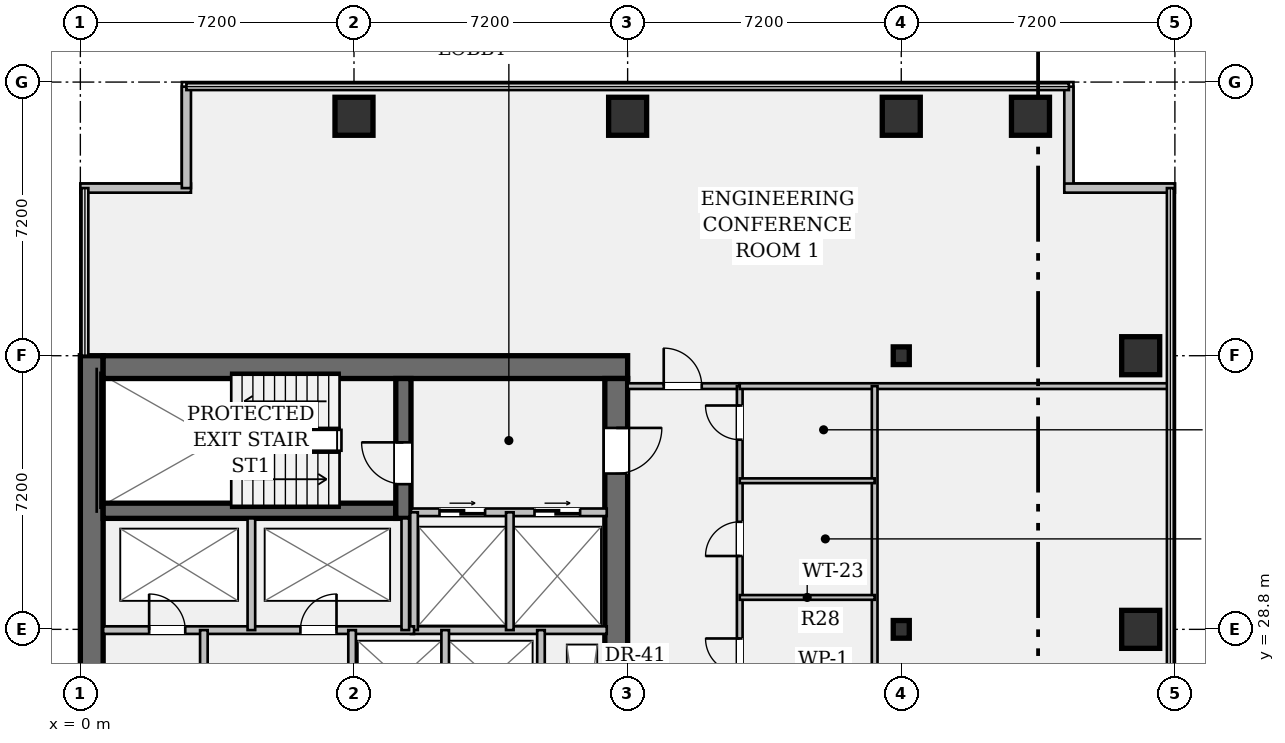
"""IFC4 building model, lengths in metres.
Left out: names, types, materials, properties, quantities, classifications, styles, units other than length and angle.
Written with IfcOpenShell. Run it as: python <this file> out.ifc"""

import sys

from ifc_helpers import new_model, si_unit, direction, frame, frame_2d, origin, origin_2d, place, context, subcontext, project, spatial, rectangle, hollow_rectangle, i_section, extrude, element, fill, save


model = new_model("IFC4")
c1 = context("Model", 3, precision=1e-05, world=origin(), true_north=direction((0.0, 1.0)))
c2 = subcontext(c1, "Body", "Model", "MODEL_VIEW")
j1 = project(units=[si_unit("LENGTHUNIT", "METRE"), si_unit("PLANEANGLEUNIT", "RADIAN")], contexts=[c1])
p1 = place(None, origin())
s1 = spatial("IfcSite", under=j1, at=p1, CompositionType="ELEMENT")
p2 = place(p1, origin())
s2 = spatial("IfcBuilding", under=s1, at=p2, CompositionType="ELEMENT")
p3 = place(p2, frame((0.0, 0.0, 54.25)))
s3 = spatial("IfcBuildingStorey", under=s2, at=p3, CompositionType="ELEMENT", Elevation=54.25)
p4 = place(p3, frame((0.3, 7.2, 0.0), z_axis=(0.0, 0.0, 1.0), x_axis=(0.0, 1.0, 0.0)))
e1 = element("IfcWall", 1, at=p4, inside=s3, PredefinedType="SHEAR", context=c2, shape_type="SweptSolid", body=[
    extrude(rectangle(XDim=28.8, YDim=0.6, at=frame_2d((14.4, 0.0))), origin(), (0.0, 0.0, 1.0), 3.57),
])
p5 = place(p3, frame((0.6, 35.7, 0.0), z_axis=(0.0, 0.0, 1.0), x_axis=(1.0, 0.0, 0.0)))
e2 = element("IfcWall", 2, at=p5, inside=s3, PredefinedType="SHEAR", context=c2, shape_type="SweptSolid", body=[
    extrude(rectangle(XDim=13.8, YDim=0.6, at=frame_2d((6.9, 0.0))), origin(), (0.0, 0.0, 1.0), 3.57),
])
p6 = place(p3, frame((14.1, 35.4, 0.0), z_axis=(0.0, 0.0, 1.0), x_axis=(0.0, -1.0, 0.0)))
e3 = element("IfcWall", 3, at=p6, inside=s3, PredefinedType="SHEAR", context=c2, shape_type="SweptSolid", body=[
    extrude(rectangle(XDim=27.6, YDim=0.6, at=frame_2d((13.8, 0.0))), origin(), (0.0, 0.0, 1.0), 3.57),
])
p7 = place(p6, frame((1.3, 0.0, 0.0)))
e4 = element("IfcOpeningElement", 4, at=p7, cuts=e3, PredefinedType="OPENING", context=c2, shape_type="SweptSolid", body=[
    extrude(rectangle(XDim=1.2, YDim=2.15, at=frame_2d((0.6, 1.075))), frame((0.0, 0.312, 0.0), z_axis=(0.0, -1.0, 0.0), x_axis=(1.0, 0.0, 0.0)), (0.0, 0.0, 1.0), 0.624),
])
p8 = place(p6, frame((25.25, 0.0, 0.0)))
e5 = element("IfcOpeningElement", 5, at=p8, cuts=e3, PredefinedType="OPENING", context=c2, shape_type="SweptSolid", body=[
    extrude(rectangle(XDim=1.2, YDim=2.15, at=frame_2d((0.6, 1.075))), frame((0.0, 0.312, 0.0), z_axis=(0.0, -1.0, 0.0), x_axis=(1.0, 0.0, 0.0)), (0.0, 0.0, 1.0), 0.624),
])
p9 = place(p6, frame((14.6, 0.0, 0.0)))
e6 = element("IfcOpeningElement", 6, at=p9, cuts=e3, PredefinedType="OPENING", context=c2, shape_type="SweptSolid", body=[
    extrude(rectangle(XDim=1.6, YDim=2.2, at=frame_2d((0.8, 1.1))), frame((0.0, 0.312, 0.0), z_axis=(0.0, -1.0, 0.0), x_axis=(1.0, 0.0, 0.0)), (0.0, 0.0, 1.0), 0.624),
])
p10 = place(p3, frame((0.6, 31.92, 0.0), z_axis=(0.0, 0.0, 1.0), x_axis=(1.0, 0.0, 0.0)))
e7 = element("IfcWall", 7, at=p10, inside=s3, PredefinedType="SHEAR", context=c2, shape_type="SweptSolid", body=[
    extrude(rectangle(XDim=7.7, YDim=0.4, at=frame_2d((3.85, 0.0))), origin(), (0.0, 0.0, 1.0), 3.57),
])
p11 = place(p3, frame((8.5, 31.72, 0.0), z_axis=(0.0, 0.0, 1.0), x_axis=(0.0, 1.0, 0.0)))
e8 = element("IfcWall", 8, at=p11, inside=s3, PredefinedType="SHEAR", context=c2, shape_type="SweptSolid", body=[
    extrude(rectangle(XDim=3.68, YDim=0.4, at=frame_2d((1.84, 0.0))), origin(), (0.0, 0.0, 1.0), 3.57),
])
p12 = place(p11, frame((0.9, 0.0, 0.0)))
e9 = element("IfcOpeningElement", 9, at=p12, cuts=e8, PredefinedType="OPENING", context=c2, shape_type="SweptSolid", body=[
    extrude(rectangle(XDim=1.1, YDim=2.15, at=frame_2d((0.55, 1.075))), frame((0.0, 0.212, 0.0), z_axis=(0.0, -1.0, 0.0), x_axis=(1.0, 0.0, 0.0)), (0.0, 0.0, 1.0), 0.424),
])
for number, where, z_axis, x_axis in (
    (10, (7.2, 42.3, 0.0), (0.0, 0.0, 1.0), (1.0, 0.0, 0.0)),
    (11, (14.4, 42.3, 0.0), (0.0, 0.0, 1.0), (1.0, 0.0, 0.0)),
):
    element("IfcColumn", number, at=place(p3, frame(where, z_axis=z_axis, x_axis=x_axis)), inside=s3, PredefinedType="COLUMN", context=c2, shape_type="SweptSolid", body=[
        extrude(hollow_rectangle(XDim=1.0, YDim=1.0, WallThickness=0.065, at=origin_2d()), origin(), (0.0, 0.0, 1.0), 3.57),
    ])
for number, where, z_axis, x_axis in (
    (12, (21.6, 28.8, 0.0), (0.0, 0.0, 1.0), (1.0, 0.0, 0.0)),
    (13, (21.6, 36.0, 0.0), (0.0, 0.0, 1.0), (1.0, 0.0, 0.0)),
):
    element("IfcColumn", number, at=place(p3, frame(where, z_axis=z_axis, x_axis=x_axis)), inside=s3, PredefinedType="COLUMN", context=c2, shape_type="SweptSolid", body=[
        extrude(i_section(OverallWidth=0.422, OverallDepth=0.465, WebThickness=0.045, FlangeThickness=0.073, FilletRadius=0.018, at=origin_2d()), origin(), (0.0, 0.0, 1.0), 3.57),
    ])
for number, where, z_axis, x_axis in (
    (14, (21.6, 42.3, 0.0), (0.0, 0.0, 1.0), (1.0, 0.0, 0.0)),
    (15, (25.0, 42.3, 0.0), (0.0, 0.0, 1.0), (1.0, 0.0, 0.0)),
    (16, (27.9, 28.8, 0.0), (0.0, 0.0, 1.0), (1.0, 0.0, 0.0)),
    (17, (27.9, 36.0, 0.0), (0.0, 0.0, 1.0), (1.0, 0.0, 0.0)),
):
    element("IfcColumn", number, at=place(p3, frame(where, z_axis=z_axis, x_axis=x_axis)), inside=s3, PredefinedType="COLUMN", context=c2, shape_type="SweptSolid", body=[
        extrude(hollow_rectangle(XDim=1.0, YDim=1.0, WallThickness=0.065, at=origin_2d()), origin(), (0.0, 0.0, 1.0), 3.57),
    ])
p13 = place(p3, frame((0.0, 40.41, 0.0), z_axis=(0.0, 0.0, 1.0), x_axis=(1.0, 0.0, 0.0)))
e18 = element("IfcWall", 18, at=p13, inside=s3, PredefinedType="STANDARD", context=c2, shape_type="SweptSolid", body=[
    extrude(rectangle(XDim=2.91, YDim=0.24, at=frame_2d((1.455, 0.0))), origin(), (0.0, 0.0, 1.0), 3.57),
])
for number, where, z_axis, x_axis in (
    (19, (2.79, 40.41, 0.0), (0.0, 0.0, 1.0), (0.0, 1.0, 0.0)),
    (20, (26.01, 43.08, 0.0), (0.0, 0.0, 1.0), (0.0, -1.0, 0.0)),
):
    element("IfcWall", number, at=place(p3, frame(where, z_axis=z_axis, x_axis=x_axis)), inside=s3, PredefinedType="STANDARD", context=c2, shape_type="SweptSolid", body=[
        extrude(rectangle(XDim=2.67, YDim=0.24, at=frame_2d((1.335, 0.0))), origin(), (0.0, 0.0, 1.0), 3.57),
    ])
p14 = place(p3, frame((25.89, 40.41, 0.0), z_axis=(0.0, 0.0, 1.0), x_axis=(1.0, 0.0, 0.0)))
e21 = element("IfcWall", 21, at=p14, inside=s3, PredefinedType="STANDARD", context=c2, shape_type="SweptSolid", body=[
    extrude(rectangle(XDim=2.91, YDim=0.24, at=frame_2d((1.455, 0.0))), origin(), (0.0, 0.0, 1.0), 3.57),
])
p15 = place(p3, frame((8.7, 31.88, 0.0), z_axis=(0.0, 0.0, 1.0), x_axis=(1.0, 0.0, 0.0)))
e22 = element("IfcWall", 22, at=p15, inside=s3, PredefinedType="PARTITIONING", context=c2, shape_type="SweptSolid", body=[
    extrude(rectangle(XDim=5.15, YDim=0.2, at=frame_2d((2.575, 0.0))), origin(), (0.0, 0.0, 1.0), 3.57),
])
p16 = place(p15, frame((0.75, 0.0, 0.0)))
e23 = element("IfcOpeningElement", 23, at=p16, cuts=e22, PredefinedType="OPENING", context=c2, shape_type="SweptSolid", body=[
    extrude(rectangle(XDim=1.2, YDim=2.2, at=frame_2d((0.6, 1.1))), frame((0.0, 0.112, 0.0), z_axis=(0.0, -1.0, 0.0), x_axis=(1.0, 0.0, 0.0)), (0.0, 0.0, 1.0), 0.224),
])
p17 = place(p15, frame((3.25, 0.0, 0.0)))
e24 = element("IfcOpeningElement", 24, at=p17, cuts=e22, PredefinedType="OPENING", context=c2, shape_type="SweptSolid", body=[
    extrude(rectangle(XDim=1.2, YDim=2.2, at=frame_2d((0.6, 1.1))), frame((0.0, 0.112, 0.0), z_axis=(0.0, -1.0, 0.0), x_axis=(1.0, 0.0, 0.0)), (0.0, 0.0, 1.0), 0.224),
])
p18 = place(p3, frame((8.7, 28.78, 0.0), z_axis=(0.0, 0.0, 1.0), x_axis=(1.0, 0.0, 0.0)))
e25 = element("IfcWall", 25, at=p18, inside=s3, PredefinedType="PARTITIONING", context=c2, shape_type="SweptSolid", body=[
    extrude(rectangle(XDim=5.15, YDim=0.2, at=frame_2d((2.575, 0.0))), origin(), (0.0, 0.0, 1.0), 3.57),
])
for number, where, z_axis, x_axis in (
    (26, (8.78, 28.78, 0.0), (0.0, 0.0, 1.0), (0.0, 1.0, 0.0)),
    (27, (11.3, 28.78, 0.0), (0.0, 0.0, 1.0), (0.0, 1.0, 0.0)),
):
    element("IfcWall", number, at=place(p3, frame(where, z_axis=z_axis, x_axis=x_axis)), inside=s3, PredefinedType="PARTITIONING", context=c2, shape_type="SweptSolid", body=[
        extrude(rectangle(XDim=3.1, YDim=0.2, at=frame_2d((1.55, 0.0))), origin(), (0.0, 0.0, 1.0), 3.57),
    ])
p19 = place(p3, frame((0.6, 28.78, 0.0), z_axis=(0.0, 0.0, 1.0), x_axis=(1.0, 0.0, 0.0)))
e28 = element("IfcWall", 28, at=p19, inside=s3, PredefinedType="PARTITIONING", context=c2, shape_type="SweptSolid", body=[
    extrude(rectangle(XDim=8.18, YDim=0.2, at=frame_2d((4.09, 0.0))), origin(), (0.0, 0.0, 1.0), 3.57),
])
p20 = place(p19, frame((1.21, 0.0, 0.0)))
e29 = element("IfcOpeningElement", 29, at=p20, cuts=e28, PredefinedType="OPENING", context=c2, shape_type="SweptSolid", body=[
    extrude(rectangle(XDim=0.95, YDim=2.15, at=frame_2d((0.475, 1.075))), frame((0.0, 0.112, 0.0), z_axis=(0.0, -1.0, 0.0), x_axis=(1.0, 0.0, 0.0)), (0.0, 0.0, 1.0), 0.224),
])
p21 = place(p19, frame((5.19, 0.0, 0.0)))
e30 = element("IfcOpeningElement", 30, at=p21, cuts=e28, PredefinedType="OPENING", context=c2, shape_type="SweptSolid", body=[
    extrude(rectangle(XDim=0.95, YDim=2.15, at=frame_2d((0.475, 1.075))), frame((0.0, 0.112, 0.0), z_axis=(0.0, -1.0, 0.0), x_axis=(1.0, 0.0, 0.0)), (0.0, 0.0, 1.0), 0.224),
])
for number, where, z_axis, x_axis in (
    (31, (4.5, 28.78, 0.0), (0.0, 0.0, 1.0), (0.0, 1.0, 0.0)),
    (32, (8.55, 28.78, 0.0), (0.0, 0.0, 1.0), (0.0, 1.0, 0.0)),
):
    element("IfcWall", number, at=place(p3, frame(where, z_axis=z_axis, x_axis=x_axis)), inside=s3, PredefinedType="PARTITIONING", context=c2, shape_type="SweptSolid", body=[
        extrude(rectangle(XDim=2.94, YDim=0.2, at=frame_2d((1.47, 0.0))), origin(), (0.0, 0.0, 1.0), 3.57),
    ])
p22 = place(p3, frame((3.25, 15.7, 0.0), z_axis=(0.0, 0.0, 1.0), x_axis=(0.0, 1.0, 0.0)))
e33 = element("IfcWall", 33, at=p22, inside=s3, PredefinedType="PARTITIONING", context=c2, shape_type="SweptSolid", body=[
    extrude(rectangle(XDim=13.08, YDim=0.2, at=frame_2d((6.54, 0.0))), origin(), (0.0, 0.0, 1.0), 3.57),
])
for number, where, z_axis, x_axis in (
    (34, (7.15, 26.4, 0.0), (0.0, 0.0, 1.0), (0.0, 1.0, 0.0)),
    (35, (9.6, 26.4, 0.0), (0.0, 0.0, 1.0), (0.0, 1.0, 0.0)),
):
    element("IfcWall", number, at=place(p3, frame(where, z_axis=z_axis, x_axis=x_axis)), inside=s3, PredefinedType="PARTITIONING", context=c2, shape_type="SweptSolid", body=[
        extrude(rectangle(XDim=2.38, YDim=0.2, at=frame_2d((1.19, 0.0))), origin(), (0.0, 0.0, 1.0), 3.57),
    ])
p23 = place(p3, frame((12.12, 22.2, 0.0), z_axis=(0.0, 0.0, 1.0), x_axis=(0.0, 1.0, 0.0)))
e36 = element("IfcWall", 36, at=p23, inside=s3, PredefinedType="PARTITIONING", context=c2, shape_type="SweptSolid", body=[
    extrude(rectangle(XDim=6.58, YDim=0.2, at=frame_2d((3.29, 0.0))), origin(), (0.0, 0.0, 1.0), 3.57),
])
p24 = place(p23, frame((2.75, 0.0, 0.0)))
e37 = element("IfcOpeningElement", 37, at=p24, cuts=e36, PredefinedType="OPENING", context=c2, shape_type="SweptSolid", body=[
    extrude(rectangle(XDim=0.85, YDim=2.15, at=frame_2d((0.425, 1.075))), frame((0.0, 0.112, 0.0), z_axis=(0.0, -1.0, 0.0), x_axis=(1.0, 0.0, 0.0)), (0.0, 0.0, 1.0), 0.224),
])
p25 = place(p3, frame((14.4, 35.2, 0.0), z_axis=(0.0, 0.0, 1.0), x_axis=(1.0, 0.0, 0.0)))
e38 = element("IfcWall", 38, at=p25, inside=s3, PredefinedType="PARTITIONING", context=c2, shape_type="SweptSolid", body=[
    extrude(rectangle(XDim=2.95, YDim=0.15, at=frame_2d((1.475, 0.0))), origin(), (0.0, 0.0, 1.0), 3.088),
])
p26 = place(p25, frame((0.95, 0.0, 0.0)))
e39 = element("IfcOpeningElement", 39, at=p26, cuts=e38, PredefinedType="OPENING", context=c2, shape_type="SweptSolid", body=[
    extrude(rectangle(XDim=1.0, YDim=2.15, at=frame_2d((0.5, 1.075))), frame((0.0, 0.087, 0.0), z_axis=(0.0, -1.0, 0.0), x_axis=(1.0, 0.0, 0.0)), (0.0, 0.0, 1.0), 0.174),
])
p27 = place(p3, frame((17.35, 20.8, 0.0), z_axis=(0.0, 0.0, 1.0), x_axis=(0.0, 1.0, 0.0)))
e40 = element("IfcWall", 40, at=p27, inside=s3, PredefinedType="PARTITIONING", context=c2, shape_type="SweptSolid", body=[
    extrude(rectangle(XDim=14.4, YDim=0.15, at=frame_2d((7.2, 0.0))), origin(), (0.0, 0.0, 1.0), 2.699),
])
p28 = place(p27, frame((3.79, 0.0, 0.0)))
e41 = element("IfcOpeningElement", 41, at=p28, cuts=e40, PredefinedType="OPENING", context=c2, shape_type="SweptSolid", body=[
    extrude(rectangle(XDim=0.9, YDim=2.15, at=frame_2d((0.45, 1.075))), frame((0.0, 0.087, 0.0), z_axis=(0.0, -1.0, 0.0), x_axis=(1.0, 0.0, 0.0)), (0.0, 0.0, 1.0), 0.174),
])
p29 = place(p27, frame((6.86, 0.0, 0.0)))
e42 = element("IfcOpeningElement", 42, at=p29, cuts=e40, PredefinedType="OPENING", context=c2, shape_type="SweptSolid", body=[
    extrude(rectangle(XDim=0.9, YDim=2.15, at=frame_2d((0.45, 1.075))), frame((0.0, 0.087, 0.0), z_axis=(0.0, -1.0, 0.0), x_axis=(1.0, 0.0, 0.0)), (0.0, 0.0, 1.0), 0.174),
])
p30 = place(p27, frame((9.93, 0.0, 0.0)))
e43 = element("IfcOpeningElement", 43, at=p30, cuts=e40, PredefinedType="OPENING", context=c2, shape_type="SweptSolid", body=[
    extrude(rectangle(XDim=0.9, YDim=2.15, at=frame_2d((0.45, 1.075))), frame((0.0, 0.087, 0.0), z_axis=(0.0, -1.0, 0.0), x_axis=(1.0, 0.0, 0.0)), (0.0, 0.0, 1.0), 0.174),
])
p31 = place(p27, frame((12.99, 0.0, 0.0)))
e44 = element("IfcOpeningElement", 44, at=p31, cuts=e40, PredefinedType="OPENING", context=c2, shape_type="SweptSolid", body=[
    extrude(rectangle(XDim=0.9, YDim=2.15, at=frame_2d((0.45, 1.075))), frame((0.0, 0.087, 0.0), z_axis=(0.0, -1.0, 0.0), x_axis=(1.0, 0.0, 0.0)), (0.0, 0.0, 1.0), 0.174),
])
p32 = place(p3, frame((17.35, 35.2, 0.0), z_axis=(0.0, 0.0, 1.0), x_axis=(1.0, 0.0, 0.0)))
e45 = element("IfcWall", 45, at=p32, inside=s3, PredefinedType="PARTITIONING", context=c2, shape_type="SweptSolid", body=[
    extrude(rectangle(XDim=11.33, YDim=0.15, at=frame_2d((5.665, 0.0))), origin(), (0.0, 0.0, 1.0), 2.699),
])
p33 = place(p3, frame((20.9, 23.4, 0.0), z_axis=(0.0, 0.0, 1.0), x_axis=(0.0, 1.0, 0.0)))
e46 = element("IfcWall", 46, at=p33, inside=s3, PredefinedType="PARTITIONING", context=c2, shape_type="SweptSolid", body=[
    extrude(rectangle(XDim=11.8, YDim=0.15, at=frame_2d((5.9, 0.0))), origin(), (0.0, 0.0, 1.0), 2.699),
])
for number, where, z_axis, x_axis in (
    (47, (17.35, 29.64, 0.0), (0.0, 0.0, 1.0), (1.0, 0.0, 0.0)),
    (48, (17.35, 32.71, 0.0), (0.0, 0.0, 1.0), (1.0, 0.0, 0.0)),
):
    element("IfcWall", number, at=place(p3, frame(where, z_axis=z_axis, x_axis=x_axis)), inside=s3, PredefinedType="PARTITIONING", context=c2, shape_type="SweptSolid", body=[
        extrude(rectangle(XDim=3.55, YDim=0.125, at=frame_2d((1.775, 0.0))), origin(), (0.0, 0.0, 1.0), 3.088),
    ])
p34 = place(p12, origin())
e49 = element("IfcDoor", 49, at=p34, inside=s3, OperationType="SINGLE_SWING_RIGHT", PredefinedType="DOOR", context=c2, shape_type="SweptSolid", body=[
    extrude(rectangle(XDim=1.1, YDim=2.15, at=frame_2d((0.55, 1.075))), frame((0.0, 0.025, 0.0), z_axis=(0.0, -1.0, 0.0), x_axis=(1.0, 0.0, 0.0)), (0.0, 0.0, 1.0), 0.05),
])
fill(e9, e49)
p35 = place(p7, origin())
e50 = element("IfcDoor", 50, at=p35, inside=s3, OperationType="SINGLE_SWING_LEFT", PredefinedType="DOOR", context=c2, shape_type="SweptSolid", body=[
    extrude(rectangle(XDim=1.2, YDim=2.15, at=frame_2d((0.6, 1.075))), frame((0.0, 0.025, 0.0), z_axis=(0.0, -1.0, 0.0), x_axis=(1.0, 0.0, 0.0)), (0.0, 0.0, 1.0), 0.05),
])
fill(e4, e50)
p36 = place(p16, origin())
e51 = element("IfcDoor", 51, at=p36, inside=s3, OperationType="DOUBLE_DOOR_SLIDING", PredefinedType="DOOR", context=c2, shape_type="SweptSolid", body=[
    extrude(rectangle(XDim=1.2, YDim=2.2, at=frame_2d((0.6, 1.1))), frame((0.0, 0.025, 0.0), z_axis=(0.0, -1.0, 0.0), x_axis=(1.0, 0.0, 0.0)), (0.0, 0.0, 1.0), 0.05),
])
fill(e23, e51)
p37 = place(p17, origin())
e52 = element("IfcDoor", 52, at=p37, inside=s3, OperationType="DOUBLE_DOOR_SLIDING", PredefinedType="DOOR", context=c2, shape_type="SweptSolid", body=[
    extrude(rectangle(XDim=1.2, YDim=2.2, at=frame_2d((0.6, 1.1))), frame((0.0, 0.025, 0.0), z_axis=(0.0, -1.0, 0.0), x_axis=(1.0, 0.0, 0.0)), (0.0, 0.0, 1.0), 0.05),
])
fill(e24, e52)
p38 = place(p20, origin())
e53 = element("IfcDoor", 53, at=p38, inside=s3, OperationType="SINGLE_SWING_LEFT", PredefinedType="DOOR", context=c2, shape_type="SweptSolid", body=[
    extrude(rectangle(XDim=0.95, YDim=2.15, at=frame_2d((0.475, 1.075))), frame((0.0, 0.025, 0.0), z_axis=(0.0, -1.0, 0.0), x_axis=(1.0, 0.0, 0.0)), (0.0, 0.0, 1.0), 0.05),
])
fill(e29, e53)
p39 = place(p21, origin())
e54 = element("IfcDoor", 54, at=p39, inside=s3, OperationType="SINGLE_SWING_RIGHT", PredefinedType="DOOR", context=c2, shape_type="SweptSolid", body=[
    extrude(rectangle(XDim=0.95, YDim=2.15, at=frame_2d((0.475, 1.075))), frame((0.0, 0.025, 0.0), z_axis=(0.0, -1.0, 0.0), x_axis=(1.0, 0.0, 0.0)), (0.0, 0.0, 1.0), 0.05),
])
fill(e30, e54)
p40 = place(p26, origin())
e55 = element("IfcDoor", 55, at=p40, inside=s3, OperationType="SINGLE_SWING_LEFT", PredefinedType="DOOR", context=c2, shape_type="SweptSolid", body=[
    extrude(rectangle(XDim=1.0, YDim=2.15, at=frame_2d((0.5, 1.075))), frame((0.0, 0.025, 0.0), z_axis=(0.0, -1.0, 0.0), x_axis=(1.0, 0.0, 0.0)), (0.0, 0.0, 1.0), 0.05),
])
fill(e39, e55)
p41 = place(p29, origin())
e56 = element("IfcDoor", 56, at=p41, inside=s3, OperationType="SINGLE_SWING_RIGHT", PredefinedType="DOOR", context=c2, shape_type="SweptSolid", body=[
    extrude(rectangle(XDim=0.9, YDim=2.15, at=frame_2d((0.45, 1.075))), frame((0.0, 0.025, 0.0), z_axis=(0.0, -1.0, 0.0), x_axis=(1.0, 0.0, 0.0)), (0.0, 0.0, 1.0), 0.05),
])
fill(e42, e56)
p42 = place(p30, origin())
e57 = element("IfcDoor", 57, at=p42, inside=s3, OperationType="SINGLE_SWING_LEFT", PredefinedType="DOOR", context=c2, shape_type="SweptSolid", body=[
    extrude(rectangle(XDim=0.9, YDim=2.15, at=frame_2d((0.45, 1.075))), frame((0.0, 0.025, 0.0), z_axis=(0.0, -1.0, 0.0), x_axis=(1.0, 0.0, 0.0)), (0.0, 0.0, 1.0), 0.05),
])
fill(e43, e57)
p43 = place(p31, origin())
e58 = element("IfcDoor", 58, at=p43, inside=s3, OperationType="SINGLE_SWING_RIGHT", PredefinedType="DOOR", context=c2, shape_type="SweptSolid", body=[
    extrude(rectangle(XDim=0.9, YDim=2.15, at=frame_2d((0.45, 1.075))), frame((0.0, 0.025, 0.0), z_axis=(0.0, -1.0, 0.0), x_axis=(1.0, 0.0, 0.0)), (0.0, 0.0, 1.0), 0.05),
])
fill(e44, e58)
save(model, sys.argv[1])
